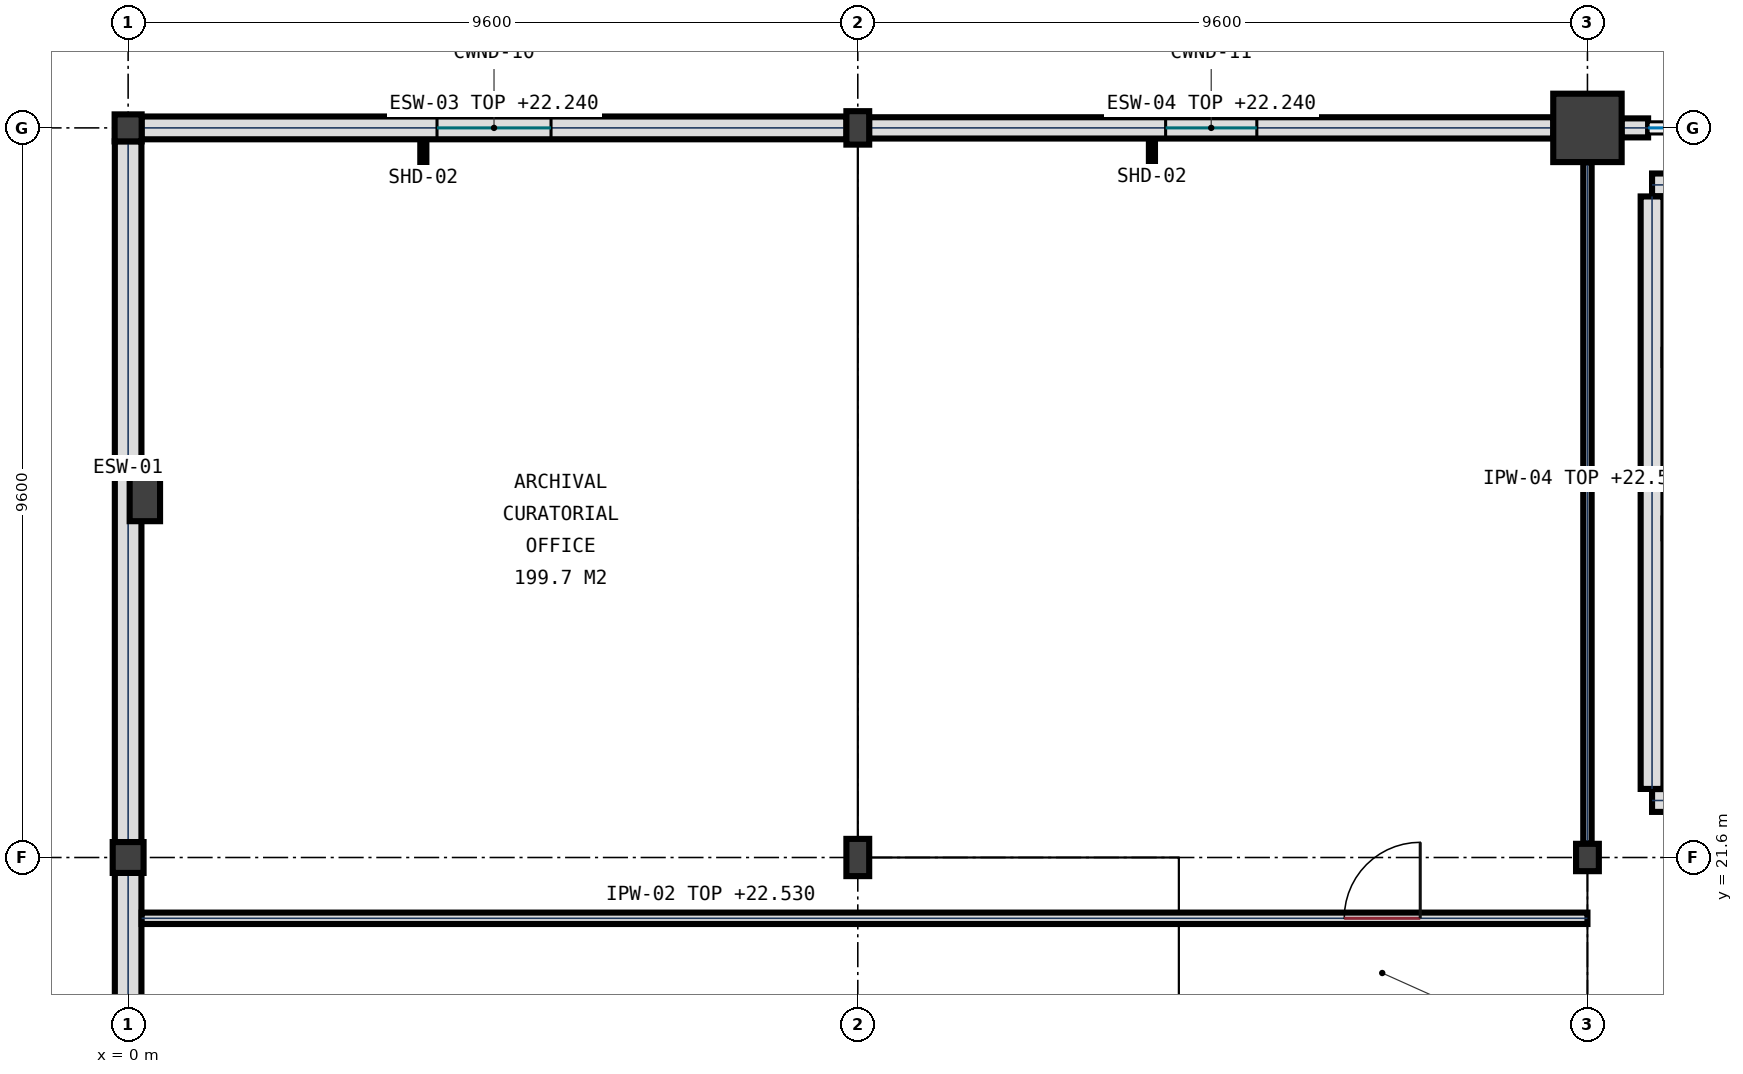
"""IFC4 building model, lengths in metres.
Left out: names, types, materials, properties, quantities, classifications, styles, units other than length and angle.
Written with IfcOpenShell. Run it as: python <this file> out.ifc"""

import sys

from ifc_helpers import new_model, si_unit, direction, frame, frame_2d, origin, origin_2d, place, context, subcontext, project, spatial, rectangle, circle, hollow_circle, i_section, extrude, element, fill, save


model = new_model("IFC4")
c1 = context("Model", 3, precision=1e-05, world=origin(), true_north=direction((0.0, 1.0)))
c2 = subcontext(c1, "Body", "Model", "MODEL_VIEW")
j1 = project(units=[si_unit("LENGTHUNIT", "METRE"), si_unit("PLANEANGLEUNIT", "RADIAN")], contexts=[c1])
p1 = place(None, origin())
s1 = spatial("IfcSite", under=j1, at=p1, CompositionType="ELEMENT")
p2 = place(p1, origin())
s2 = spatial("IfcBuilding", under=s1, at=p2, CompositionType="ELEMENT")
p3 = place(p2, frame((0.0, 0.0, 18.9)))
s3 = spatial("IfcBuildingStorey", under=s2, at=p3, CompositionType="ELEMENT", Elevation=18.9)
p4 = place(p3, frame((0.0, 21.6, 0.0), z_axis=(0.0, 0.0, 1.0), x_axis=(1.0, 0.0, 0.0)))
e1 = element("IfcColumn", 1, at=p4, inside=s3, PredefinedType="COLUMN", context=c2, shape_type="SweptSolid", body=[
    extrude(hollow_circle(Radius=0.203, WallThickness=0.016, at=origin_2d()), origin(), (0.0, 0.0, 1.0), 4.5),
])
p5 = place(p3, frame((0.0, 31.2, 0.0), z_axis=(0.0, 0.0, 1.0), x_axis=(1.0, 0.0, 0.0)))
e2 = element("IfcColumn", 2, at=p5, inside=s3, PredefinedType="COLUMN", context=c2, shape_type="SweptSolid", body=[
    extrude(hollow_circle(Radius=0.178, WallThickness=0.014, at=origin_2d()), origin(), (0.0, 0.0, 1.0), 4.5),
])
p6 = place(p3, frame((9.6, 21.6, 0.0), z_axis=(0.0, 0.0, 1.0), x_axis=(1.0, 0.0, 0.0)))
e3 = element("IfcColumn", 3, at=p6, inside=s3, PredefinedType="COLUMN", context=c2, shape_type="SweptSolid", body=[
    extrude(i_section(OverallWidth=0.3, OverallDepth=0.49, WebThickness=0.012, FlangeThickness=0.023, FilletRadius=0.027, at=origin_2d()), origin(), (0.0, 0.0, 1.0), 4.5),
])
p7 = place(p3, frame((9.6, 31.2, 0.0), z_axis=(0.0, 0.0, 1.0), x_axis=(1.0, 0.0, 0.0)))
e4 = element("IfcColumn", 4, at=p7, inside=s3, PredefinedType="COLUMN", context=c2, shape_type="SweptSolid", body=[
    extrude(i_section(OverallWidth=0.3, OverallDepth=0.44, WebThickness=0.011, FlangeThickness=0.021, FilletRadius=0.027, at=origin_2d()), origin(), (0.0, 0.0, 1.0), 4.5),
])
p8 = place(p3, frame((19.2, 21.6, 0.0), z_axis=(0.0, 0.0, 1.0), x_axis=(1.0, 0.0, 0.0)))
e5 = element("IfcColumn", 5, at=p8, inside=s3, PredefinedType="COLUMN", context=c2, shape_type="SweptSolid", body=[
    extrude(i_section(OverallWidth=0.3, OverallDepth=0.36, WebThickness=0.012, FlangeThickness=0.022, FilletRadius=0.027, at=origin_2d()), origin(), (0.0, 0.0, 1.0), 4.5),
])
p9 = place(p3, frame((19.2, 31.2, 0.0), z_axis=(0.0, 0.0, 1.0), x_axis=(1.0, 0.0, 0.0)))
e6 = element("IfcColumn", 6, at=p9, inside=s3, PredefinedType="COLUMN", context=c2, shape_type="SweptSolid", body=[
    extrude(circle(Radius=0.45, at=origin_2d()), origin(), (0.0, 0.0, 1.0), 4.5),
])
p10 = place(p3, frame((0.22, 26.4, 0.0), z_axis=(0.0, 0.0, 1.0), x_axis=(1.0, 0.0, 0.0)))
e7 = element("IfcColumn", 7, at=p10, inside=s3, PredefinedType="PILASTER", context=c2, shape_type="SweptSolid", body=[
    extrude(rectangle(XDim=0.4, YDim=0.75, at=origin_2d()), origin(), (0.0, 0.0, 1.0), 4.5),
])
p11 = place(p3, frame((0.0, 12.218, 0.0), z_axis=(0.0, 0.0, 1.0), x_axis=(0.0, 1.0, 0.0)))
e8 = element("IfcWall", 8, at=p11, inside=s3, PredefinedType="SOLIDWALL", context=c2, shape_type="SweptSolid", body=[
    extrude(rectangle(XDim=9.181, YDim=0.35, at=frame_2d((4.59, 0.0))), origin(), (0.0, 0.0, 1.0), 4.24),
])
p12 = place(p3, frame((0.0, 21.801, 0.0), z_axis=(0.0, 0.0, 1.0), x_axis=(0.0, 1.0, 0.0)))
e9 = element("IfcWall", 9, at=p12, inside=s3, PredefinedType="SOLIDWALL", context=c2, shape_type="SweptSolid", body=[
    extrude(rectangle(XDim=9.223, YDim=0.35, at=frame_2d((4.611, 0.0))), origin(), (0.0, 0.0, 1.0), 4.24),
])
p13 = place(p3, frame((0.176, 31.2, 0.0), z_axis=(0.0, 0.0, 1.0), x_axis=(1.0, 0.0, 0.0)))
e10 = element("IfcWall", 10, at=p13, inside=s3, PredefinedType="SOLIDWALL", context=c2, shape_type="SweptSolid", body=[
    extrude(rectangle(XDim=9.276, YDim=0.3, at=frame_2d((4.638, 0.0))), origin(), (0.0, 0.0, 1.0), 3.34),
])
p14 = place(p13, frame((3.888, 0.0, 0.95)))
e11 = element("IfcOpeningElement", 11, at=p14, cuts=e10, PredefinedType="OPENING", context=c2, shape_type="SweptSolid", body=[
    extrude(rectangle(XDim=1.5, YDim=1.35, at=frame_2d((0.75, 0.675))), frame((0.0, 0.16, 0.0), z_axis=(0.0, -1.0, 0.0), x_axis=(1.0, 0.0, 0.0)), (0.0, 0.0, 1.0), 0.32),
])
p15 = place(p3, frame((9.748, 31.2, 0.0), z_axis=(0.0, 0.0, 1.0), x_axis=(1.0, 0.0, 0.0)))
e12 = element("IfcWall", 12, at=p15, inside=s3, PredefinedType="SOLIDWALL", context=c2, shape_type="SweptSolid", body=[
    extrude(rectangle(XDim=9.004, YDim=0.28, at=frame_2d((4.502, 0.0))), origin(), (0.0, 0.0, 1.0), 3.34),
])
p16 = place(p15, frame((3.902, 0.0, 0.95)))
e13 = element("IfcOpeningElement", 13, at=p16, cuts=e12, PredefinedType="OPENING", context=c2, shape_type="SweptSolid", body=[
    extrude(rectangle(XDim=1.2, YDim=1.35, at=frame_2d((0.6, 0.675))), frame((0.0, 0.15, 0.0), z_axis=(0.0, -1.0, 0.0), x_axis=(1.0, 0.0, 0.0)), (0.0, 0.0, 1.0), 0.3),
])
p17 = place(p3, frame((19.648, 31.2, 0.0), z_axis=(0.0, 0.0, 1.0), x_axis=(1.0, 0.0, 0.0)))
e14 = element("IfcWall", 14, at=p17, inside=s3, PredefinedType="SOLIDWALL", context=c2, shape_type="SweptSolid", body=[
    extrude(rectangle(XDim=0.35, YDim=0.25, at=frame_2d((0.175, 0.0))), origin(), (0.0, 0.0, 1.0), 3.63),
])
for number, where, z_axis, x_axis in (
    (15, (29.55, 22.35, 0.0), (0.0, 0.0, 1.0), (-1.0, 0.0, 0.0)),
    (16, (20.05, 30.45, 0.0), (0.0, 0.0, 1.0), (1.0, 0.0, 0.0)),
):
    element("IfcWall", number, at=place(p3, frame(where, z_axis=z_axis, x_axis=x_axis)), inside=s3, PredefinedType="SHEAR", context=c2, shape_type="SweptSolid", body=[
        extrude(rectangle(XDim=9.5, YDim=0.3, at=frame_2d((4.75, 0.0))), origin(), (0.0, 0.0, 1.0), 4.5),
    ])
p18 = place(p3, frame((20.05, 22.502, 0.0), z_axis=(0.0, 0.0, 1.0), x_axis=(0.0, 1.0, 0.0)))
e17 = element("IfcWall", 17, at=p18, inside=s3, PredefinedType="SHEAR", context=c2, shape_type="SweptSolid", body=[
    extrude(rectangle(XDim=7.796, YDim=0.3, at=frame_2d((3.898, 0.0))), origin(), (0.0, 0.0, 1.0), 4.5),
])
p19 = place(p3, frame((0.178, 20.8, 0.0), z_axis=(0.0, 0.0, 1.0), x_axis=(1.0, 0.0, 0.0)))
e18 = element("IfcWall", 18, at=p19, inside=s3, PredefinedType="PARTITIONING", context=c2, shape_type="SweptSolid", body=[
    extrude(rectangle(XDim=19.022, YDim=0.15, at=frame_2d((9.511, 0.0))), origin(), (0.0, 0.0, 1.0), 3.63),
])
p20 = place(p19, frame((15.822, 0.0, 0.0)))
e19 = element("IfcOpeningElement", 19, at=p20, cuts=e18, PredefinedType="OPENING", context=c2, shape_type="SweptSolid", body=[
    extrude(rectangle(XDim=1.0, YDim=2.2, at=frame_2d((0.5, 1.1))), frame((0.0, 0.085, 0.0), z_axis=(0.0, -1.0, 0.0), x_axis=(1.0, 0.0, 0.0)), (0.0, 0.0, 1.0), 0.17),
])
p21 = place(p3, frame((19.2, 21.783, 0.0), z_axis=(0.0, 0.0, 1.0), x_axis=(0.0, 1.0, 0.0)))
e20 = element("IfcWall", 20, at=p21, inside=s3, PredefinedType="PARTITIONING", context=c2, shape_type="SweptSolid", body=[
    extrude(rectangle(XDim=8.964, YDim=0.11, at=frame_2d((4.482, 0.0))), origin(), (0.0, 0.0, 1.0), 3.63),
])
p22 = place(p14, origin())
e21 = element("IfcWindow", 21, at=p22, inside=s3, PartitioningType="SINGLE_PANEL", PredefinedType="WINDOW", context=c2, shape_type="SweptSolid", body=[
    extrude(rectangle(XDim=1.5, YDim=1.35, at=frame_2d((0.75, 0.675))), frame((0.0, 0.032, 0.0), z_axis=(0.0, -1.0, 0.0), x_axis=(1.0, 0.0, 0.0)), (0.0, 0.0, 1.0), 0.065),
])
fill(e11, e21)
p23 = place(p16, origin())
e22 = element("IfcWindow", 22, at=p23, inside=s3, PartitioningType="SINGLE_PANEL", PredefinedType="WINDOW", context=c2, shape_type="SweptSolid", body=[
    extrude(rectangle(XDim=1.2, YDim=1.35, at=frame_2d((0.6, 0.675))), frame((0.0, 0.032, 0.0), z_axis=(0.0, -1.0, 0.0), x_axis=(1.0, 0.0, 0.0)), (0.0, 0.0, 1.0), 0.065),
])
fill(e13, e22)
p24 = place(p20, origin())
e23 = element("IfcDoor", 23, at=p24, inside=s3, OperationType="SINGLE_SWING_RIGHT", PredefinedType="DOOR", context=c2, shape_type="SweptSolid", body=[
    extrude(rectangle(XDim=1.0, YDim=2.2, at=frame_2d((0.5, 1.1))), frame((0.0, 0.032, 0.0), z_axis=(0.0, -1.0, 0.0), x_axis=(1.0, 0.0, 0.0)), (0.0, 0.0, 1.0), 0.065),
])
fill(e19, e23)
save(model, sys.argv[1])
